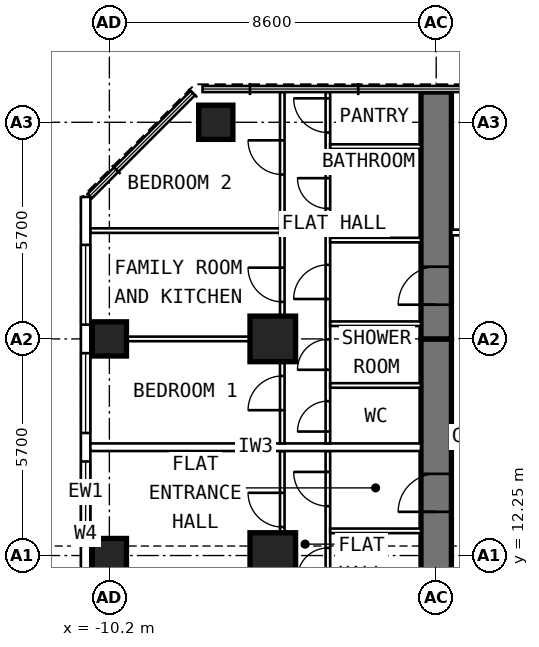
"""IFC4 building model, lengths in metres.
Left out: names, types, materials, properties, quantities, classifications, styles, units other than length and angle.
Written with IfcOpenShell. Run it as: python <this file> out.ifc"""

import sys

from ifc_helpers import new_model, si_unit, direction, frame, frame_2d, origin, origin_2d, place, context, subcontext, project, spatial, rectangle, extrude, element, fill, save


model = new_model("IFC4")
c1 = context("Model", 3, precision=1e-05, world=origin(), true_north=direction((0.0, 1.0)))
c2 = subcontext(c1, "Body", "Model", "MODEL_VIEW")
j1 = project(units=[si_unit("LENGTHUNIT", "METRE"), si_unit("PLANEANGLEUNIT", "RADIAN")], contexts=[c1])
p1 = place(None, origin())
s1 = spatial("IfcSite", under=j1, at=p1, CompositionType="ELEMENT")
p2 = place(p1, origin())
s2 = spatial("IfcBuilding", under=s1, at=p2, CompositionType="ELEMENT")
p3 = place(p2, frame((0.0, 0.0, 161.6)))
s3 = spatial("IfcBuildingStorey", under=s2, at=p3, CompositionType="ELEMENT", Elevation=161.6)
for number, where, z_axis, x_axis in (
    (1, (-10.2, 12.25, 0.0), (0.0, 0.0, 1.0), (0.0, 1.0, 0.0)),
    (2, (-10.2, 17.95, 0.0), (0.0, 0.0, 1.0), (0.0, 1.0, 0.0)),
    (3, (-7.4, 23.65, 0.0), (0.0, 0.0, 1.0), (0.0, 1.0, 0.0)),
):
    element("IfcColumn", number, at=place(p3, frame(where, z_axis=z_axis, x_axis=x_axis)), inside=s3, PredefinedType="COLUMN", context=c2, shape_type="SweptSolid", body=[
        extrude(rectangle(XDim=0.9, YDim=0.9, at=origin_2d()), origin(), (0.0, 0.0, 1.0), 3.6),
    ])
for number, where, z_axis, x_axis in (
    (4, (-5.9, 12.25, 0.0), (0.0, 0.0, 1.0), (0.0, 1.0, 0.0)),
    (5, (-5.9, 17.95, 0.0), (0.0, 0.0, 1.0), (0.0, 1.0, 0.0)),
):
    element("IfcColumn", number, at=place(p3, frame(where, z_axis=z_axis, x_axis=x_axis)), inside=s3, PredefinedType="COLUMN", context=c2, shape_type="SweptSolid", body=[
        extrude(rectangle(XDim=1.2, YDim=1.2, at=origin_2d()), origin(), (0.0, 0.0, 1.0), 3.6),
    ])
p4 = place(p3, frame((-1.6, 9.6, 0.0), z_axis=(0.0, 0.0, 1.0), x_axis=(0.0, 1.0, 0.0)))
e6 = element("IfcWall", 6, at=p4, inside=s3, PredefinedType="SHEAR", context=c2, shape_type="SweptSolid", body=[
    extrude(rectangle(XDim=8.35, YDim=0.8, at=frame_2d((4.175, 0.0))), origin(), (0.0, 0.0, 1.0), 3.6),
])
p5 = place(p4, frame((3.8, 0.0, 0.0)))
e7 = element("IfcOpeningElement", 7, at=p5, cuts=e6, PredefinedType="OPENING", context=c2, shape_type="SweptSolid", body=[
    extrude(rectangle(XDim=1.0, YDim=2.1, at=frame_2d((0.5, 1.05))), frame((0.0, 0.412, 0.0), z_axis=(0.0, -1.0, 0.0), x_axis=(1.0, 0.0, 0.0)), (0.0, 0.0, 1.0), 0.824),
])
p6 = place(p3, frame((-1.6, 17.95, 0.0), z_axis=(0.0, 0.0, 1.0), x_axis=(0.0, 1.0, 0.0)))
e8 = element("IfcWall", 8, at=p6, inside=s3, PredefinedType="SHEAR", context=c2, shape_type="SweptSolid", body=[
    extrude(rectangle(XDim=6.495, YDim=0.8, at=frame_2d((3.248, 0.0))), origin(), (0.0, 0.0, 1.0), 3.6),
])
p7 = place(p6, frame((0.9, 0.0, 0.0)))
e9 = element("IfcOpeningElement", 9, at=p7, cuts=e8, PredefinedType="OPENING", context=c2, shape_type="SweptSolid", body=[
    extrude(rectangle(XDim=1.0, YDim=2.1, at=frame_2d((0.5, 1.05))), frame((0.0, 0.412, 0.0), z_axis=(0.0, -1.0, 0.0), x_axis=(1.0, 0.0, 0.0)), (0.0, 0.0, 1.0), 0.824),
])
p8 = place(p3, frame((-10.825, 6.148, 0.0), z_axis=(0.0, 0.0, 1.0), x_axis=(0.0, 1.0, 0.0)))
e10 = element("IfcWall", 10, at=p8, inside=s3, PredefinedType="SOLIDWALL", context=c2, shape_type="SweptSolid", body=[
    extrude(rectangle(XDim=15.537, YDim=0.25, at=frame_2d((7.769, 0.0))), origin(), (0.0, 0.0, 1.0), 3.35),
])
p9 = place(p8, frame((0.777, 0.0, 0.8)))
e11 = element("IfcOpeningElement", 11, at=p9, cuts=e10, PredefinedType="OPENING", context=c2, shape_type="SweptSolid", body=[
    extrude(rectangle(XDim=2.1, YDim=1.8, at=frame_2d((1.05, 0.9))), frame((0.0, 0.137, 0.0), z_axis=(0.0, -1.0, 0.0), x_axis=(1.0, 0.0, 0.0)), (0.0, 0.0, 1.0), 0.274),
])
p10 = place(p8, frame((3.627, 0.0, 0.8)))
e12 = element("IfcOpeningElement", 12, at=p10, cuts=e10, PredefinedType="OPENING", context=c2, shape_type="SweptSolid", body=[
    extrude(rectangle(XDim=2.1, YDim=1.8, at=frame_2d((1.05, 0.9))), frame((0.0, 0.137, 0.0), z_axis=(0.0, -1.0, 0.0), x_axis=(1.0, 0.0, 0.0)), (0.0, 0.0, 1.0), 0.274),
])
p11 = place(p8, frame((6.477, 0.0, 0.8)))
e13 = element("IfcOpeningElement", 13, at=p11, cuts=e10, PredefinedType="OPENING", context=c2, shape_type="SweptSolid", body=[
    extrude(rectangle(XDim=2.1, YDim=1.8, at=frame_2d((1.05, 0.9))), frame((0.0, 0.137, 0.0), z_axis=(0.0, -1.0, 0.0), x_axis=(1.0, 0.0, 0.0)), (0.0, 0.0, 1.0), 0.274),
])
p12 = place(p8, frame((9.327, 0.0, 0.8)))
e14 = element("IfcOpeningElement", 14, at=p12, cuts=e10, PredefinedType="OPENING", context=c2, shape_type="SweptSolid", body=[
    extrude(rectangle(XDim=2.1, YDim=1.8, at=frame_2d((1.05, 0.9))), frame((0.0, 0.137, 0.0), z_axis=(0.0, -1.0, 0.0), x_axis=(1.0, 0.0, 0.0)), (0.0, 0.0, 1.0), 0.274),
])
p13 = place(p8, frame((12.177, 0.0, 0.8)))
e15 = element("IfcOpeningElement", 15, at=p13, cuts=e10, PredefinedType="OPENING", context=c2, shape_type="SweptSolid", body=[
    extrude(rectangle(XDim=2.1, YDim=1.8, at=frame_2d((1.05, 0.9))), frame((0.0, 0.137, 0.0), z_axis=(0.0, -1.0, 0.0), x_axis=(1.0, 0.0, 0.0)), (0.0, 0.0, 1.0), 0.274),
])
p14 = place(p3, frame((-4.45, 10.05, 0.0), z_axis=(0.0, 0.0, 1.0), x_axis=(0.0, 1.0, 0.0)))
e16 = element("IfcWall", 16, at=p14, inside=s3, PredefinedType="PARTITIONING", context=c2, shape_type="SweptSolid", body=[
    extrude(rectangle(XDim=4.95, YDim=0.12, at=frame_2d((2.475, 0.0))), origin(), (0.0, 0.0, 1.0), 3.35),
])
p15 = place(p14, frame((1.6, 0.0, 0.0)))
e17 = element("IfcOpeningElement", 17, at=p15, cuts=e16, PredefinedType="OPENING", context=c2, shape_type="SweptSolid", body=[
    extrude(rectangle(XDim=0.8, YDim=2.1, at=frame_2d((0.4, 1.05))), frame((0.0, 0.072, 0.0), z_axis=(0.0, -1.0, 0.0), x_axis=(1.0, 0.0, 0.0)), (0.0, 0.0, 1.0), 0.144),
])
p16 = place(p14, frame((3.5, 0.0, 0.0)))
e18 = element("IfcOpeningElement", 18, at=p16, cuts=e16, PredefinedType="OPENING", context=c2, shape_type="SweptSolid", body=[
    extrude(rectangle(XDim=0.9, YDim=2.1, at=frame_2d((0.45, 1.05))), frame((0.0, 0.072, 0.0), z_axis=(0.0, -1.0, 0.0), x_axis=(1.0, 0.0, 0.0)), (0.0, 0.0, 1.0), 0.144),
])
p17 = place(p3, frame((-5.65, 9.6, 0.0), z_axis=(0.0, 0.0, 1.0), x_axis=(0.0, 1.0, 0.0)))
e19 = element("IfcWall", 19, at=p17, inside=s3, PredefinedType="PARTITIONING", context=c2, shape_type="SweptSolid", body=[
    extrude(rectangle(XDim=5.4, YDim=0.12, at=frame_2d((2.7, 0.0))), origin(), (0.0, 0.0, 1.0), 3.35),
])
p18 = place(p17, frame((3.4, 0.0, 0.0)))
e20 = element("IfcOpeningElement", 20, at=p18, cuts=e19, PredefinedType="OPENING", context=c2, shape_type="SweptSolid", body=[
    extrude(rectangle(XDim=0.9, YDim=2.1, at=frame_2d((0.45, 1.05))), frame((0.0, 0.072, 0.0), z_axis=(0.0, -1.0, 0.0), x_axis=(1.0, 0.0, 0.0)), (0.0, 0.0, 1.0), 0.144),
])
p19 = place(p3, frame((-2.0, 12.9, 0.0), z_axis=(0.0, 0.0, 1.0), x_axis=(-1.0, 0.0, 0.0)))
e21 = element("IfcWall", 21, at=p19, inside=s3, PredefinedType="PARTITIONING", context=c2, shape_type="SweptSolid", body=[
    extrude(rectangle(XDim=2.39, YDim=0.12, at=frame_2d((1.195, 0.0))), origin(), (0.0, 0.0, 1.0), 3.35),
])
p20 = place(p3, frame((-4.45, 15.2, 0.0), z_axis=(0.0, 0.0, 1.0), x_axis=(0.0, 1.0, 0.0)))
e22 = element("IfcWall", 22, at=p20, inside=s3, PredefinedType="PARTITIONING", context=c2, shape_type="SweptSolid", body=[
    extrude(rectangle(XDim=9.245, YDim=0.12, at=frame_2d((4.623, 0.0))), origin(), (0.0, 0.0, 1.0), 3.35),
])
p21 = place(p20, frame((0.312, 0.0, 0.0)))
e23 = element("IfcOpeningElement", 23, at=p21, cuts=e22, PredefinedType="OPENING", context=c2, shape_type="SweptSolid", body=[
    extrude(rectangle(XDim=0.8, YDim=2.1, at=frame_2d((0.4, 1.05))), frame((0.0, 0.072, 0.0), z_axis=(0.0, -1.0, 0.0), x_axis=(1.0, 0.0, 0.0)), (0.0, 0.0, 1.0), 0.144),
])
p22 = place(p20, frame((1.938, 0.0, 0.0)))
e24 = element("IfcOpeningElement", 24, at=p22, cuts=e22, PredefinedType="OPENING", context=c2, shape_type="SweptSolid", body=[
    extrude(rectangle(XDim=0.8, YDim=2.1, at=frame_2d((0.4, 1.05))), frame((0.0, 0.072, 0.0), z_axis=(0.0, -1.0, 0.0), x_axis=(1.0, 0.0, 0.0)), (0.0, 0.0, 1.0), 0.144),
])
p23 = place(p20, frame((3.8, 0.0, 0.0)))
e25 = element("IfcOpeningElement", 25, at=p23, cuts=e22, PredefinedType="OPENING", context=c2, shape_type="SweptSolid", body=[
    extrude(rectangle(XDim=0.9, YDim=2.1, at=frame_2d((0.45, 1.05))), frame((0.0, 0.072, 0.0), z_axis=(0.0, -1.0, 0.0), x_axis=(1.0, 0.0, 0.0)), (0.0, 0.0, 1.0), 0.144),
])
p24 = place(p20, frame((6.18, 0.0, 0.0)))
e26 = element("IfcOpeningElement", 26, at=p24, cuts=e22, PredefinedType="OPENING", context=c2, shape_type="SweptSolid", body=[
    extrude(rectangle(XDim=0.8, YDim=2.1, at=frame_2d((0.4, 1.05))), frame((0.0, 0.072, 0.0), z_axis=(0.0, -1.0, 0.0), x_axis=(1.0, 0.0, 0.0)), (0.0, 0.0, 1.0), 0.144),
])
p25 = place(p20, frame((8.18, 0.0, 0.0)))
e27 = element("IfcOpeningElement", 27, at=p25, cuts=e22, PredefinedType="OPENING", context=c2, shape_type="SweptSolid", body=[
    extrude(rectangle(XDim=0.9, YDim=2.1, at=frame_2d((0.45, 1.05))), frame((0.0, 0.072, 0.0), z_axis=(0.0, -1.0, 0.0), x_axis=(1.0, 0.0, 0.0)), (0.0, 0.0, 1.0), 0.144),
])
p26 = place(p3, frame((-5.65, 15.2, 0.0), z_axis=(0.0, 0.0, 1.0), x_axis=(0.0, 1.0, 0.0)))
e28 = element("IfcWall", 28, at=p26, inside=s3, PredefinedType="PARTITIONING", context=c2, shape_type="SweptSolid", body=[
    extrude(rectangle(XDim=9.245, YDim=0.12, at=frame_2d((4.623, 0.0))), origin(), (0.0, 0.0, 1.0), 3.35),
])
p27 = place(p26, frame((0.875, 0.0, 0.0)))
e29 = element("IfcOpeningElement", 29, at=p27, cuts=e28, PredefinedType="OPENING", context=c2, shape_type="SweptSolid", body=[
    extrude(rectangle(XDim=0.9, YDim=2.1, at=frame_2d((0.45, 1.05))), frame((0.0, 0.072, 0.0), z_axis=(0.0, -1.0, 0.0), x_axis=(1.0, 0.0, 0.0)), (0.0, 0.0, 1.0), 0.144),
])
p28 = place(p26, frame((3.725, 0.0, 0.0)))
e30 = element("IfcOpeningElement", 30, at=p28, cuts=e28, PredefinedType="OPENING", context=c2, shape_type="SweptSolid", body=[
    extrude(rectangle(XDim=0.9, YDim=2.1, at=frame_2d((0.45, 1.05))), frame((0.0, 0.072, 0.0), z_axis=(0.0, -1.0, 0.0), x_axis=(1.0, 0.0, 0.0)), (0.0, 0.0, 1.0), 0.144),
])
p29 = place(p26, frame((7.075, 0.0, 0.0)))
e31 = element("IfcOpeningElement", 31, at=p29, cuts=e28, PredefinedType="OPENING", context=c2, shape_type="SweptSolid", body=[
    extrude(rectangle(XDim=0.9, YDim=2.1, at=frame_2d((0.45, 1.05))), frame((0.0, 0.072, 0.0), z_axis=(0.0, -1.0, 0.0), x_axis=(1.0, 0.0, 0.0)), (0.0, 0.0, 1.0), 0.144),
])
p30 = place(p3, frame((-5.71, 17.95, 0.0), z_axis=(0.0, 0.0, 1.0), x_axis=(-1.0, 0.0, 0.0)))
e32 = element("IfcWall", 32, at=p30, inside=s3, PredefinedType="PARTITIONING", context=c2, shape_type="SweptSolid", body=[
    extrude(rectangle(XDim=4.99, YDim=0.12, at=frame_2d((2.495, 0.0))), origin(), (0.0, 0.0, 1.0), 2.45),
])
p31 = place(p3, frame((-5.71, 20.8, 0.0), z_axis=(0.0, 0.0, 1.0), x_axis=(-1.0, 0.0, 0.0)))
e33 = element("IfcWall", 33, at=p31, inside=s3, PredefinedType="PARTITIONING", context=c2, shape_type="SweptSolid", body=[
    extrude(rectangle(XDim=4.99, YDim=0.12, at=frame_2d((2.495, 0.0))), origin(), (0.0, 0.0, 1.0), 3.35),
])
for number, where, z_axis, x_axis in (
    (34, (-2.0, 16.725, 0.0), (0.0, 0.0, 1.0), (-1.0, 0.0, 0.0)),
    (35, (-2.0, 18.35, 0.0), (0.0, 0.0, 1.0), (-1.0, 0.0, 0.0)),
    (36, (-2.0, 20.55, 0.0), (0.0, 0.0, 1.0), (-1.0, 0.0, 0.0)),
    (37, (-2.0, 23.01, 0.0), (0.0, 0.0, 1.0), (-1.0, 0.0, 0.0)),
):
    element("IfcWall", number, at=place(p3, frame(where, z_axis=z_axis, x_axis=x_axis)), inside=s3, PredefinedType="PARTITIONING", context=c2, shape_type="SweptSolid", body=[
        extrude(rectangle(XDim=2.39, YDim=0.12, at=frame_2d((1.195, 0.0))), origin(), (0.0, 0.0, 1.0), 3.35),
    ])
p32 = place(p3, frame((-2.0, 15.1, 0.0), z_axis=(0.0, 0.0, 1.0), x_axis=(-1.0, 0.0, 0.0)))
e38 = element("IfcWall", 38, at=p32, inside=s3, PredefinedType="PARTITIONING", context=c2, shape_type="SweptSolid", body=[
    extrude(rectangle(XDim=8.7, YDim=0.2, at=frame_2d((4.35, 0.0))), origin(), (0.0, 0.0, 1.0), 3.35),
])
p33 = place(p3, frame((1.2, 20.75, 0.0), z_axis=(0.0, 0.0, 1.0), x_axis=(-1.0, 0.0, 0.0)))
e39 = element("IfcWall", 39, at=p33, inside=s3, PredefinedType="PARTITIONING", context=c2, shape_type="SweptSolid", body=[
    extrude(rectangle(XDim=2.4, YDim=0.15, at=frame_2d((1.2, 0.0))), origin(), (0.0, 0.0, 1.0), 3.35),
])
p34 = place(p33, frame((0.7, 0.0, 0.0)))
e40 = element("IfcOpeningElement", 40, at=p34, cuts=e39, PredefinedType="OPENING", context=c2, shape_type="SweptSolid", body=[
    extrude(rectangle(XDim=1.0, YDim=2.1, at=frame_2d((0.5, 1.05))), frame((0.0, 0.087, 0.0), z_axis=(0.0, -1.0, 0.0), x_axis=(1.0, 0.0, 0.0)), (0.0, 0.0, 1.0), 0.174),
])
p35 = place(p11, origin())
e41 = element("IfcWindow", 41, at=p35, inside=s3, PartitioningType="SINGLE_PANEL", PredefinedType="WINDOW", context=c2, shape_type="SweptSolid", body=[
    extrude(rectangle(XDim=2.1, YDim=1.8, at=frame_2d((1.05, 0.9))), frame((0.0, 0.03, 0.0), z_axis=(0.0, -1.0, 0.0), x_axis=(1.0, 0.0, 0.0)), (0.0, 0.0, 1.0), 0.06),
])
fill(e13, e41)
p36 = place(p12, origin())
e42 = element("IfcWindow", 42, at=p36, inside=s3, PartitioningType="SINGLE_PANEL", PredefinedType="WINDOW", context=c2, shape_type="SweptSolid", body=[
    extrude(rectangle(XDim=2.1, YDim=1.8, at=frame_2d((1.05, 0.9))), frame((0.0, 0.03, 0.0), z_axis=(0.0, -1.0, 0.0), x_axis=(1.0, 0.0, 0.0)), (0.0, 0.0, 1.0), 0.06),
])
fill(e14, e42)
p37 = place(p13, origin())
e43 = element("IfcWindow", 43, at=p37, inside=s3, PartitioningType="SINGLE_PANEL", PredefinedType="WINDOW", context=c2, shape_type="SweptSolid", body=[
    extrude(rectangle(XDim=2.1, YDim=1.8, at=frame_2d((1.05, 0.9))), frame((0.0, 0.03, 0.0), z_axis=(0.0, -1.0, 0.0), x_axis=(1.0, 0.0, 0.0)), (0.0, 0.0, 1.0), 0.06),
])
fill(e15, e43)
p38 = place(p5, origin())
e44 = element("IfcDoor", 44, at=p38, inside=s3, OperationType="SINGLE_SWING_LEFT", PredefinedType="DOOR", context=c2, shape_type="SweptSolid", body=[
    extrude(rectangle(XDim=1.0, YDim=2.1, at=frame_2d((0.5, 1.05))), frame((0.0, 0.15, 0.0), z_axis=(0.0, -1.0, 0.0), x_axis=(1.0, 0.0, 0.0)), (0.0, 0.0, 1.0), 0.3),
])
fill(e7, e44)
p39 = place(p18, origin())
e45 = element("IfcDoor", 45, at=p39, inside=s3, OperationType="SINGLE_SWING_RIGHT", PredefinedType="DOOR", context=c2, shape_type="SweptSolid", body=[
    extrude(rectangle(XDim=0.9, YDim=2.1, at=frame_2d((0.45, 1.05))), frame((0.0, 0.025, 0.0), z_axis=(0.0, -1.0, 0.0), x_axis=(1.0, 0.0, 0.0)), (0.0, 0.0, 1.0), 0.05),
])
fill(e20, e45)
p40 = place(p15, origin())
e46 = element("IfcDoor", 46, at=p40, inside=s3, OperationType="SINGLE_SWING_LEFT", PredefinedType="DOOR", context=c2, shape_type="SweptSolid", body=[
    extrude(rectangle(XDim=0.8, YDim=2.1, at=frame_2d((0.4, 1.05))), frame((0.0, 0.025, 0.0), z_axis=(0.0, -1.0, 0.0), x_axis=(1.0, 0.0, 0.0)), (0.0, 0.0, 1.0), 0.05),
])
fill(e17, e46)
p41 = place(p16, origin())
e47 = element("IfcDoor", 47, at=p41, inside=s3, OperationType="SINGLE_SWING_RIGHT", PredefinedType="DOOR", context=c2, shape_type="SweptSolid", body=[
    extrude(rectangle(XDim=0.9, YDim=2.1, at=frame_2d((0.45, 1.05))), frame((0.0, 0.025, 0.0), z_axis=(0.0, -1.0, 0.0), x_axis=(1.0, 0.0, 0.0)), (0.0, 0.0, 1.0), 0.05),
])
fill(e18, e47)
p42 = place(p7, origin())
e48 = element("IfcDoor", 48, at=p42, inside=s3, OperationType="SINGLE_SWING_LEFT", PredefinedType="DOOR", context=c2, shape_type="SweptSolid", body=[
    extrude(rectangle(XDim=1.0, YDim=2.1, at=frame_2d((0.5, 1.05))), frame((0.0, 0.15, 0.0), z_axis=(0.0, -1.0, 0.0), x_axis=(1.0, 0.0, 0.0)), (0.0, 0.0, 1.0), 0.3),
])
fill(e9, e48)
p43 = place(p27, origin())
e49 = element("IfcDoor", 49, at=p43, inside=s3, OperationType="SINGLE_SWING_LEFT", PredefinedType="DOOR", context=c2, shape_type="SweptSolid", body=[
    extrude(rectangle(XDim=0.9, YDim=2.1, at=frame_2d((0.45, 1.05))), frame((0.0, 0.025, 0.0), z_axis=(0.0, -1.0, 0.0), x_axis=(1.0, 0.0, 0.0)), (0.0, 0.0, 1.0), 0.05),
])
fill(e29, e49)
p44 = place(p28, origin())
e50 = element("IfcDoor", 50, at=p44, inside=s3, OperationType="SINGLE_SWING_RIGHT", PredefinedType="DOOR", context=c2, shape_type="SweptSolid", body=[
    extrude(rectangle(XDim=0.9, YDim=2.1, at=frame_2d((0.45, 1.05))), frame((0.0, 0.025, 0.0), z_axis=(0.0, -1.0, 0.0), x_axis=(1.0, 0.0, 0.0)), (0.0, 0.0, 1.0), 0.05),
])
fill(e30, e50)
p45 = place(p29, origin())
e51 = element("IfcDoor", 51, at=p45, inside=s3, OperationType="SINGLE_SWING_RIGHT", PredefinedType="DOOR", context=c2, shape_type="SweptSolid", body=[
    extrude(rectangle(XDim=0.9, YDim=2.1, at=frame_2d((0.45, 1.05))), frame((0.0, 0.025, 0.0), z_axis=(0.0, -1.0, 0.0), x_axis=(1.0, 0.0, 0.0)), (0.0, 0.0, 1.0), 0.05),
])
fill(e31, e51)
p46 = place(p21, origin())
e52 = element("IfcDoor", 52, at=p46, inside=s3, OperationType="SINGLE_SWING_LEFT", PredefinedType="DOOR", context=c2, shape_type="SweptSolid", body=[
    extrude(rectangle(XDim=0.8, YDim=2.1, at=frame_2d((0.4, 1.05))), frame((0.0, 0.025, 0.0), z_axis=(0.0, -1.0, 0.0), x_axis=(1.0, 0.0, 0.0)), (0.0, 0.0, 1.0), 0.05),
])
fill(e23, e52)
p47 = place(p22, origin())
e53 = element("IfcDoor", 53, at=p47, inside=s3, OperationType="SINGLE_SWING_LEFT", PredefinedType="DOOR", context=c2, shape_type="SweptSolid", body=[
    extrude(rectangle(XDim=0.8, YDim=2.1, at=frame_2d((0.4, 1.05))), frame((0.0, 0.025, 0.0), z_axis=(0.0, -1.0, 0.0), x_axis=(1.0, 0.0, 0.0)), (0.0, 0.0, 1.0), 0.05),
])
fill(e24, e53)
p48 = place(p23, origin())
e54 = element("IfcDoor", 54, at=p48, inside=s3, OperationType="SINGLE_SWING_LEFT", PredefinedType="DOOR", context=c2, shape_type="SweptSolid", body=[
    extrude(rectangle(XDim=0.9, YDim=2.1, at=frame_2d((0.45, 1.05))), frame((0.0, 0.025, 0.0), z_axis=(0.0, -1.0, 0.0), x_axis=(1.0, 0.0, 0.0)), (0.0, 0.0, 1.0), 0.05),
])
fill(e25, e54)
p49 = place(p24, origin())
e55 = element("IfcDoor", 55, at=p49, inside=s3, OperationType="SINGLE_SWING_RIGHT", PredefinedType="DOOR", context=c2, shape_type="SweptSolid", body=[
    extrude(rectangle(XDim=0.8, YDim=2.1, at=frame_2d((0.4, 1.05))), frame((0.0, 0.025, 0.0), z_axis=(0.0, -1.0, 0.0), x_axis=(1.0, 0.0, 0.0)), (0.0, 0.0, 1.0), 0.05),
])
fill(e26, e55)
p50 = place(p25, origin())
e56 = element("IfcDoor", 56, at=p50, inside=s3, OperationType="SINGLE_SWING_RIGHT", PredefinedType="DOOR", context=c2, shape_type="SweptSolid", body=[
    extrude(rectangle(XDim=0.9, YDim=2.1, at=frame_2d((0.45, 1.05))), frame((0.0, 0.025, 0.0), z_axis=(0.0, -1.0, 0.0), x_axis=(1.0, 0.0, 0.0)), (0.0, 0.0, 1.0), 0.05),
])
fill(e27, e56)
save(model, sys.argv[1])
